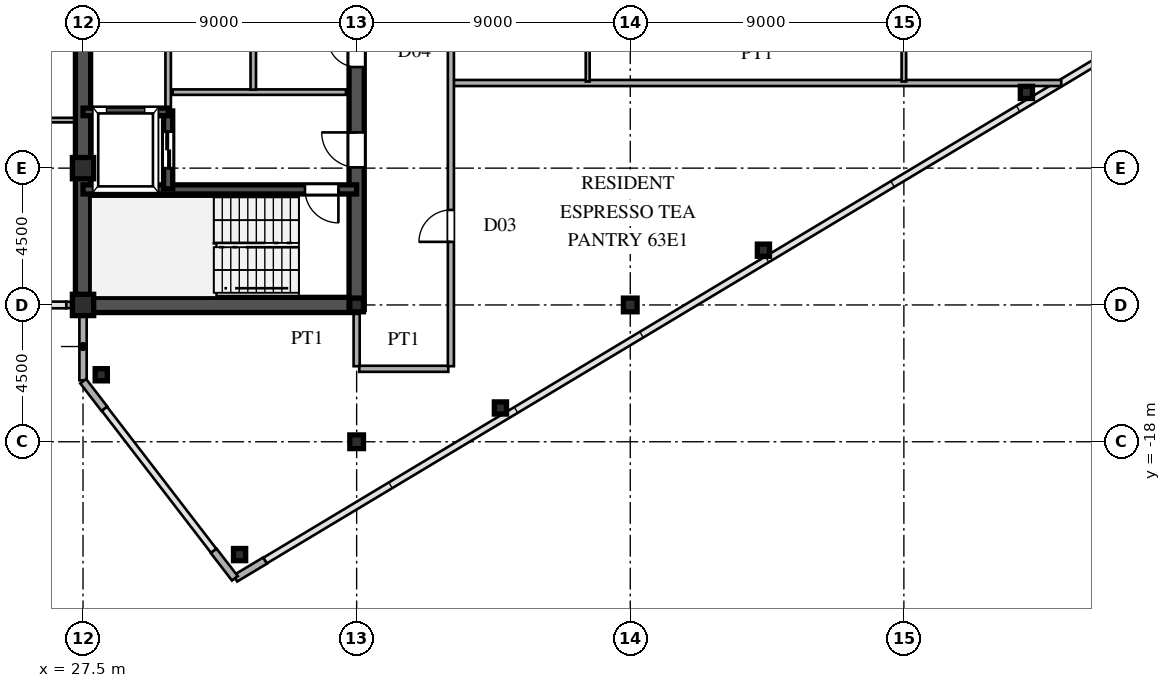
"""IFC4 building model, lengths in metres.
Left out: names, types, materials, properties, quantities, classifications, styles, units other than length and angle.
Written with IfcOpenShell. Run it as: python <this file> out.ifc"""

import sys

from ifc_helpers import new_model, si_unit, direction, frame, frame_2d, origin, origin_2d, place, context, subcontext, project, spatial, rectangle, hollow_rectangle, i_section, extrude, source, transform, mapped, element, fill, save


model = new_model("IFC4")
c1 = context("Model", 3, precision=1e-05, world=origin(), true_north=direction((0.0, 1.0)))
c2 = subcontext(c1, "Body", "Model", "MODEL_VIEW")
j1 = project(units=[si_unit("LENGTHUNIT", "METRE"), si_unit("PLANEANGLEUNIT", "RADIAN")], contexts=[c1])
p1 = place(None, origin())
s1 = spatial("IfcSite", under=j1, at=p1, CompositionType="ELEMENT")
p2 = place(p1, origin())
s2 = spatial("IfcBuilding", under=s1, at=p2, CompositionType="ELEMENT")
p3 = place(p2, frame((0.0, 0.0, 239.4)))
s3 = spatial("IfcBuildingStorey", under=s2, at=p3, CompositionType="ELEMENT", Elevation=239.4)
m1 = source(origin(), c2, "Body", "SweptSolid", [
    extrude(hollow_rectangle(XDim=0.7, YDim=0.7, WallThickness=0.03, at=origin_2d()), origin(), (0.0, 0.0, 1.0), 3.75),
])
for number, where, z_axis, x_axis in (
    (1, (27.5, -13.5, 0.0), (0.0, 0.0, 1.0), (1.0, 0.0, 0.0)),
    (2, (27.5, -9.0, 0.0), (0.0, 0.0, 1.0), (1.0, 0.0, 0.0)),
):
    element("IfcColumn", number, at=place(p3, frame(where, z_axis=z_axis, x_axis=x_axis)), inside=s3, PredefinedType="COLUMN", context=c2, shape_type="MappedRepresentation", body=[
        mapped(m1, transform((0.0, 0.0, 0.0), scale=1.0)),
    ])
m2 = source(origin(), c2, "Body", "SweptSolid", [
    extrude(i_section(OverallWidth=0.45, OverallDepth=0.45, WebThickness=0.016, FlangeThickness=0.025, at=origin_2d()), origin(), (0.0, 0.0, 1.0), 3.75),
])
for number, where, z_axis, x_axis in (
    (3, (36.5, -18.0, 0.0), (0.0, 0.0, 1.0), (1.0, 0.0, 0.0)),
    (4, (36.5, -13.5, 0.0), (0.0, 0.0, 1.0), (1.0, 0.0, 0.0)),
    (5, (45.5, -13.5, 0.0), (0.0, 0.0, 1.0), (1.0, 0.0, 0.0)),
):
    element("IfcColumn", number, at=place(p3, frame(where, z_axis=z_axis, x_axis=x_axis)), inside=s3, PredefinedType="COLUMN", context=c2, shape_type="MappedRepresentation", body=[
        mapped(m2, transform((0.0, 0.0, 0.0), scale=1.0)),
    ])
m3 = source(origin(), c2, "Body", "SweptSolid", [
    extrude(hollow_rectangle(XDim=0.4, YDim=0.4, WallThickness=0.016, at=origin_2d()), origin(), (0.0, 0.0, 1.0), 3.75),
])
for number, where, z_axis, x_axis in (
    (6, (32.65, -21.71, 0.0), (0.0, 0.0, 1.0), (1.0, 0.0, 0.0)),
    (7, (28.1, -15.796, 0.0), (0.0, 0.0, 1.0), (1.0, 0.0, 0.0)),
    (8, (41.23, -16.889, 0.0), (0.0, 0.0, 1.0), (1.0, 0.0, 0.0)),
    (9, (49.88, -11.699, 0.0), (0.0, 0.0, 1.0), (1.0, 0.0, 0.0)),
    (10, (58.53, -6.509, 0.0), (0.0, 0.0, 1.0), (1.0, 0.0, 0.0)),
):
    element("IfcColumn", number, at=place(p3, frame(where, z_axis=z_axis, x_axis=x_axis)), inside=s3, PredefinedType="COLUMN", context=c2, shape_type="MappedRepresentation", body=[
        mapped(m3, transform((0.0, 0.0, 0.0), scale=1.0)),
    ])
p4 = place(p3, frame((32.509, -22.495, 0.0), z_axis=(0.0, 0.0, 1.0), x_axis=(0.85743623509, 0.514590228002, 0.0)))
e11 = element("IfcWall", 11, at=p4, inside=s3, PredefinedType="SOLIDWALL", context=c2, shape_type="SweptSolid", body=[
    extrude(rectangle(XDim=1.14, YDim=0.24, at=frame_2d((0.57, 0.0))), origin(), (0.0, 0.0, 1.0), 3.53),
])
p5 = place(p3, frame((27.5, -15.98, 0.0), z_axis=(0.0, 0.0, 1.0), x_axis=(0.0, 1.0, 0.0)))
e12 = element("IfcWall", 12, at=p5, inside=s3, PredefinedType="SOLIDWALL", context=c2, shape_type="SweptSolid", body=[
    extrude(rectangle(XDim=1.605, YDim=0.24, at=frame_2d((0.803, 0.0))), origin(), (0.0, 0.0, 1.0), 3.53),
])
p6 = place(p3, frame((27.5, -14.375, 0.0), z_axis=(0.0, 0.0, 1.0), x_axis=(0.0, 1.0, 0.0)))
e13 = element("IfcWall", 13, at=p6, inside=s3, PredefinedType="SOLIDWALL", context=c2, shape_type="SweptSolid", body=[
    extrude(rectangle(XDim=0.62, YDim=0.24, at=frame_2d((0.31, 0.0))), origin(), (0.0, 0.0, 1.0), 3.03),
])
for number, where, z_axis, x_axis in (
    (14, (27.506, -16.008, 0.0), (0.0, 0.0, 1.0), (0.61, -0.793, 0.0)),
    (15, (31.799, -21.588, 0.0), (0.0, 0.0, 1.0), (0.61, -0.793, 0.0)),
):
    element("IfcWall", number, at=place(p3, frame(where, z_axis=z_axis, x_axis=x_axis)), inside=s3, PredefinedType="SOLIDWALL", context=c2, shape_type="SweptSolid", body=[
        extrude(rectangle(XDim=1.14, YDim=0.24, at=frame_2d((0.57, 0.0))), origin(), (0.0, 0.0, 1.0), 3.53),
    ])
p7 = place(p3, frame((26.95, -13.5, 0.0), z_axis=(0.0, 0.0, 1.0), x_axis=(1.0, 0.0, 0.0)))
e16 = element("IfcWall", 16, at=p7, inside=s3, PredefinedType="SOLIDWALL", context=c2, shape_type="SweptSolid", body=[
    extrude(rectangle(XDim=0.54, YDim=0.21, at=frame_2d((0.27, 0.0))), origin(), (0.0, 0.0, 1.0), 3.03),
])
p8 = place(p3, frame((27.5, -13.5, 0.0), z_axis=(0.0, 0.0, 1.0), x_axis=(0.0, 1.0, 0.0)))
e17 = element("IfcWall", 17, at=p8, inside=s3, PredefinedType="SHEAR", context=c2, shape_type="SweptSolid", body=[
    extrude(rectangle(XDim=12.2, YDim=0.5, at=frame_2d((6.1, 0.0))), origin(), (0.0, 0.0, 1.0), 3.53),
])
p9 = place(p3, frame((27.5, -13.5, 0.0), z_axis=(0.0, 0.0, 1.0), x_axis=(1.0, 0.0, 0.0)))
e18 = element("IfcWall", 18, at=p9, inside=s3, PredefinedType="SHEAR", context=c2, shape_type="SweptSolid", body=[
    extrude(rectangle(XDim=9.0, YDim=0.5, at=frame_2d((4.5, 0.0))), origin(), (0.0, 0.0, 1.0), 3.53),
])
p10 = place(p3, frame((36.5, -13.65, 0.0), z_axis=(0.0, 0.0, 1.0), x_axis=(0.0, 1.0, 0.0)))
e19 = element("IfcWall", 19, at=p10, inside=s3, PredefinedType="SHEAR", context=c2, shape_type="SweptSolid", body=[
    extrude(rectangle(XDim=7.15, YDim=0.5, at=frame_2d((3.575, 0.0))), origin(), (0.0, 0.0, 1.0), 3.53),
])
p11 = place(p10, frame((4.675, 0.0, 0.0)))
e20 = element("IfcOpeningElement", 20, at=p11, cuts=e19, PredefinedType="OPENING", context=c2, shape_type="SweptSolid", body=[
    extrude(rectangle(XDim=1.15, YDim=2.2, at=frame_2d((0.575, 1.1))), frame((0.0, 0.26, 0.0), z_axis=(0.0, -1.0, 0.0), x_axis=(1.0, 0.0, 0.0)), (0.0, 0.0, 1.0), 0.52),
])
p12 = place(p3, frame((36.5, -6.5, 0.0), z_axis=(0.0, 0.0, 1.0), x_axis=(0.0, 1.0, 0.0)))
e21 = element("IfcWall", 21, at=p12, inside=s3, PredefinedType="SHEAR", context=c2, shape_type="SweptSolid", body=[
    extrude(rectangle(XDim=2.6, YDim=0.5, at=frame_2d((1.3, 0.0))), origin(), (0.0, 0.0, 1.0), 3.53),
])
p13 = place(p12, frame((0.825, 0.0, 0.0)))
e22 = element("IfcOpeningElement", 22, at=p13, cuts=e21, PredefinedType="OPENING", context=c2, shape_type="SweptSolid", body=[
    extrude(rectangle(XDim=0.95, YDim=2.15, at=frame_2d((0.475, 1.075))), frame((0.0, 0.26, 0.0), z_axis=(0.0, -1.0, 0.0), x_axis=(1.0, 0.0, 0.0)), (0.0, 0.0, 1.0), 0.52),
])
p14 = place(p3, frame((27.5, -9.7, 0.0), z_axis=(0.0, 0.0, 1.0), x_axis=(1.0, 0.0, 0.0)))
e23 = element("IfcWall", 23, at=p14, inside=s3, PredefinedType="SHEAR", context=c2, shape_type="SweptSolid", body=[
    extrude(rectangle(XDim=9.0, YDim=0.3, at=frame_2d((4.5, 0.0))), origin(), (0.0, 0.0, 1.0), 3.53),
])
p15 = place(p14, frame((7.3, 0.0, 0.0)))
e24 = element("IfcOpeningElement", 24, at=p15, cuts=e23, PredefinedType="OPENING", context=c2, shape_type="SweptSolid", body=[
    extrude(rectangle(XDim=1.1, YDim=2.2, at=frame_2d((0.55, 1.1))), frame((0.0, 0.16, 0.0), z_axis=(0.0, -1.0, 0.0), x_axis=(1.0, 0.0, 0.0)), (0.0, 0.0, 1.0), 0.32),
])
p16 = place(p3, frame((27.5, -7.15, 0.0), z_axis=(0.0, 0.0, 1.0), x_axis=(1.0, 0.0, 0.0)))
e25 = element("IfcWall", 25, at=p16, inside=s3, PredefinedType="SHEAR", context=c2, shape_type="SweptSolid", body=[
    extrude(rectangle(XDim=2.8, YDim=0.25, at=frame_2d((1.4, 0.0))), origin(), (0.0, 0.0, 1.0), 3.53),
])
p17 = place(p3, frame((30.3, -9.68, 0.0), z_axis=(0.0, 0.0, 1.0), x_axis=(0.0, 1.0, 0.0)))
e26 = element("IfcWall", 26, at=p17, inside=s3, PredefinedType="SHEAR", context=c2, shape_type="SweptSolid", body=[
    extrude(rectangle(XDim=2.56, YDim=0.3, at=frame_2d((1.28, 0.0))), origin(), (0.0, 0.0, 1.0), 3.53),
])
p18 = place(p17, frame((0.68, 0.0, 0.0)))
e27 = element("IfcOpeningElement", 27, at=p18, cuts=e26, PredefinedType="OPENING", context=c2, shape_type="SweptSolid", body=[
    extrude(rectangle(XDim=1.2, YDim=2.25, at=frame_2d((0.6, 1.125))), frame((0.0, 0.16, 0.0), z_axis=(0.0, -1.0, 0.0), x_axis=(1.0, 0.0, 0.0)), (0.0, 0.0, 1.0), 0.32),
])
p19 = place(p3, frame((30.45, -6.5, 0.0), z_axis=(0.0, 0.0, 1.0), x_axis=(1.0, 0.0, 0.0)))
e28 = element("IfcWall", 28, at=p19, inside=s3, PredefinedType="PARTITIONING", context=c2, shape_type="SweptSolid", body=[
    extrude(rectangle(XDim=5.7, YDim=0.18, at=frame_2d((2.85, 0.0))), origin(), (0.0, 0.0, 1.0), 3.53),
])
p20 = place(p3, frame((33.1, -6.42, 0.0), z_axis=(0.0, 0.0, 1.0), x_axis=(0.0, 1.0, 0.0)))
e29 = element("IfcWall", 29, at=p20, inside=s3, PredefinedType="PARTITIONING", context=c2, shape_type="SweptSolid", body=[
    extrude(rectangle(XDim=5.04, YDim=0.18, at=frame_2d((2.52, 0.0))), origin(), (0.0, 0.0, 1.0), 3.53),
])
p21 = place(p3, frame((30.3, -7.12, 0.0), z_axis=(0.0, 0.0, 1.0), x_axis=(0.0, 1.0, 0.0)))
e30 = element("IfcWall", 30, at=p21, inside=s3, PredefinedType="PARTITIONING", context=c2, shape_type="SweptSolid", body=[
    extrude(rectangle(XDim=5.74, YDim=0.18, at=frame_2d((2.87, 0.0))), origin(), (0.0, 0.0, 1.0), 3.53),
])
p22 = place(p3, frame((36.585, -15.6, 0.0), z_axis=(0.0, 0.0, 1.0), x_axis=(1.0, 0.0, 0.0)))
e31 = element("IfcWall", 31, at=p22, inside=s3, PredefinedType="PARTITIONING", context=c2, shape_type="SweptSolid", body=[
    extrude(rectangle(XDim=2.93, YDim=0.2, at=frame_2d((1.465, 0.0))), origin(), (0.0, 0.0, 1.0), 3.53),
])
p23 = place(p3, frame((5.585, -7.42, 0.0), z_axis=(0.0, 0.0, 1.0), x_axis=(1.0, 0.0, 0.0)))
e32 = element("IfcWall", 32, at=p23, inside=s3, PredefinedType="PARTITIONING", context=c2, shape_type="SweptSolid", body=[
    extrude(rectangle(XDim=21.66, YDim=0.15, at=frame_2d((10.83, 0.0))), origin(), (0.0, 0.0, 1.0), 3.53),
])
p24 = place(p23, frame((3.94, 0.0, 0.0)))
e33 = element("IfcOpeningElement", 33, at=p24, cuts=e32, PredefinedType="OPENING", context=c2, shape_type="SweptSolid", body=[
    extrude(rectangle(XDim=0.95, YDim=2.15, at=frame_2d((0.475, 1.075))), frame((0.0, 0.085, 0.0), z_axis=(0.0, -1.0, 0.0), x_axis=(1.0, 0.0, 0.0)), (0.0, 0.0, 1.0), 0.17),
])
p25 = place(p23, frame((11.69, 0.0, 0.0)))
e34 = element("IfcOpeningElement", 34, at=p25, cuts=e32, PredefinedType="OPENING", context=c2, shape_type="SweptSolid", body=[
    extrude(rectangle(XDim=0.95, YDim=2.15, at=frame_2d((0.475, 1.075))), frame((0.0, 0.085, 0.0), z_axis=(0.0, -1.0, 0.0), x_axis=(1.0, 0.0, 0.0)), (0.0, 0.0, 1.0), 0.17),
])
p26 = place(p23, frame((18.19, 0.0, 0.0)))
e35 = element("IfcOpeningElement", 35, at=p26, cuts=e32, PredefinedType="OPENING", context=c2, shape_type="SweptSolid", body=[
    extrude(rectangle(XDim=0.95, YDim=2.15, at=frame_2d((0.475, 1.075))), frame((0.0, 0.085, 0.0), z_axis=(0.0, -1.0, 0.0), x_axis=(1.0, 0.0, 0.0)), (0.0, 0.0, 1.0), 0.17),
])
p27 = place(p3, frame((39.68, -6.2, 0.0), z_axis=(0.0, 0.0, 1.0), x_axis=(1.0, 0.0, 0.0)))
e36 = element("IfcWall", 36, at=p27, inside=s3, PredefinedType="PARTITIONING", context=c2, shape_type="SweptSolid", body=[
    extrude(rectangle(XDim=19.996, YDim=0.2, at=frame_2d((9.998, 0.0))), origin(), (0.0, 0.0, 1.0), 3.53),
])
p28 = place(p3, frame((36.5, -15.515, 0.0), z_axis=(0.0, 0.0, 1.0), x_axis=(0.0, 1.0, 0.0)))
e37 = element("IfcWall", 37, at=p28, inside=s3, PredefinedType="PARTITIONING", context=c2, shape_type="SweptSolid", body=[
    extrude(rectangle(XDim=1.76, YDim=0.2, at=frame_2d((0.88, 0.0))), origin(), (0.0, 0.0, 1.0), 2.93),
])
p29 = place(p3, frame((39.6, -15.515, 0.0), z_axis=(0.0, 0.0, 1.0), x_axis=(0.0, 1.0, 0.0)))
e38 = element("IfcWall", 38, at=p29, inside=s3, PredefinedType="PARTITIONING", context=c2, shape_type="SweptSolid", body=[
    extrude(rectangle(XDim=31.03, YDim=0.2, at=frame_2d((15.515, 0.0))), origin(), (0.0, 0.0, 1.0), 3.53),
])
p30 = place(p29, frame((4.09, 0.0, 0.0)))
e39 = element("IfcOpeningElement", 39, at=p30, cuts=e38, PredefinedType="OPENING", context=c2, shape_type="SweptSolid", body=[
    extrude(rectangle(XDim=1.05, YDim=2.25, at=frame_2d((0.525, 1.125))), frame((0.0, 0.11, 0.0), z_axis=(0.0, -1.0, 0.0), x_axis=(1.0, 0.0, 0.0)), (0.0, 0.0, 1.0), 0.22),
])
p31 = place(p29, frame((14.998, 0.0, 0.0)))
e40 = element("IfcOpeningElement", 40, at=p31, cuts=e38, PredefinedType="OPENING", context=c2, shape_type="SweptSolid", body=[
    extrude(rectangle(XDim=1.05, YDim=2.25, at=frame_2d((0.525, 1.125))), frame((0.0, 0.11, 0.0), z_axis=(0.0, -1.0, 0.0), x_axis=(1.0, 0.0, 0.0)), (0.0, 0.0, 1.0), 0.22),
])
p32 = place(p29, frame((26.09, 0.0, 0.0)))
e41 = element("IfcOpeningElement", 41, at=p32, cuts=e38, PredefinedType="OPENING", context=c2, shape_type="SweptSolid", body=[
    extrude(rectangle(XDim=1.05, YDim=2.25, at=frame_2d((0.525, 1.125))), frame((0.0, 0.11, 0.0), z_axis=(0.0, -1.0, 0.0), x_axis=(1.0, 0.0, 0.0)), (0.0, 0.0, 1.0), 0.22),
])
p33 = place(p3, frame((44.1, -6.15, 0.0), z_axis=(0.0, 0.0, 1.0), x_axis=(0.0, 1.0, 0.0)))
e42 = element("IfcWall", 42, at=p33, inside=s3, PredefinedType="PARTITIONING", context=c2, shape_type="SweptSolid", body=[
    extrude(rectangle(XDim=3.354, YDim=0.13, at=frame_2d((1.677, 0.0))), origin(), (0.0, 0.0, 1.0), 3.53),
])
p34 = place(p3, frame((54.5, -6.15, 0.0), z_axis=(0.0, 0.0, 1.0), x_axis=(0.0, 1.0, 0.0)))
e43 = element("IfcWall", 43, at=p34, inside=s3, PredefinedType="PARTITIONING", context=c2, shape_type="SweptSolid", body=[
    extrude(rectangle(XDim=12.7, YDim=0.15, at=frame_2d((6.35, 0.0))), origin(), (0.0, 0.0, 1.0), 2.93),
])
p35 = place(p34, frame((5.875, 0.0, 0.0)))
e44 = element("IfcOpeningElement", 44, at=p35, cuts=e43, PredefinedType="OPENING", context=c2, shape_type="SweptSolid", body=[
    extrude(rectangle(XDim=0.95, YDim=2.15, at=frame_2d((0.475, 1.075))), frame((0.0, 0.085, 0.0), z_axis=(0.0, -1.0, 0.0), x_axis=(1.0, 0.0, 0.0)), (0.0, 0.0, 1.0), 0.17),
])
m4 = source(origin(), c2, "Body", "SweptSolid", [
    extrude(rectangle(XDim=1.15, YDim=2.2, at=frame_2d((0.575, 1.1))), frame((0.0, 0.025, 0.0), z_axis=(0.0, -1.0, 0.0), x_axis=(1.0, 0.0, 0.0)), (0.0, 0.0, 1.0), 0.05),
])
p36 = place(p11, origin())
e45 = element("IfcDoor", 45, at=p36, inside=s3, OperationType="SINGLE_SWING_RIGHT", PredefinedType="DOOR", context=c2, shape_type="MappedRepresentation", body=[
    mapped(m4, transform((0.0, 0.0, 0.0), scale=1.0)),
])
fill(e20, e45)
m5 = source(origin(), c2, "Body", "SweptSolid", [
    extrude(rectangle(XDim=0.95, YDim=2.15, at=frame_2d((0.475, 1.075))), frame((0.0, 0.025, 0.0), z_axis=(0.0, -1.0, 0.0), x_axis=(1.0, 0.0, 0.0)), (0.0, 0.0, 1.0), 0.05),
])
p37 = place(p13, origin())
e46 = element("IfcDoor", 46, at=p37, inside=s3, OperationType="SINGLE_SWING_RIGHT", PredefinedType="DOOR", context=c2, shape_type="MappedRepresentation", body=[
    mapped(m5, transform((0.0, 0.0, 0.0), scale=1.0)),
])
fill(e22, e46)
m6 = source(origin(), c2, "Body", "SweptSolid", [
    extrude(rectangle(XDim=1.1, YDim=2.2, at=frame_2d((0.55, 1.1))), frame((0.0, 0.025, 0.0), z_axis=(0.0, -1.0, 0.0), x_axis=(1.0, 0.0, 0.0)), (0.0, 0.0, 1.0), 0.05),
])
p38 = place(p15, frame((1.1, 0.0, 0.0), z_axis=(0.0, 0.0, 1.0), x_axis=(-1.0, 0.0, 0.0)))
e47 = element("IfcDoor", 47, at=p38, inside=s3, OperationType="SINGLE_SWING_RIGHT", PredefinedType="DOOR", context=c2, shape_type="MappedRepresentation", body=[
    mapped(m6, transform((0.0, 0.0, 0.0), scale=1.0)),
])
fill(e24, e47)
m7 = source(origin(), c2, "Body", "SweptSolid", [
    extrude(rectangle(XDim=1.2, YDim=2.25, at=frame_2d((0.6, 1.125))), frame((0.0, 0.025, 0.0), z_axis=(0.0, -1.0, 0.0), x_axis=(1.0, 0.0, 0.0)), (0.0, 0.0, 1.0), 0.05),
])
p39 = place(p18, origin())
e48 = element("IfcDoor", 48, at=p39, inside=s3, OperationType="DOUBLE_DOOR_SLIDING", PredefinedType="DOOR", context=c2, shape_type="MappedRepresentation", body=[
    mapped(m7, transform((0.0, 0.0, 0.0), scale=1.0)),
])
fill(e27, e48)
m8 = source(origin(), c2, "Body", "SweptSolid", [
    extrude(rectangle(XDim=1.05, YDim=2.25, at=frame_2d((0.525, 1.125))), frame((0.0, 0.025, 0.0), z_axis=(0.0, -1.0, 0.0), x_axis=(1.0, 0.0, 0.0)), (0.0, 0.0, 1.0), 0.05),
])
p40 = place(p30, origin())
e49 = element("IfcDoor", 49, at=p40, inside=s3, OperationType="SINGLE_SWING_LEFT", PredefinedType="DOOR", context=c2, shape_type="MappedRepresentation", body=[
    mapped(m8, transform((0.0, 0.0, 0.0), scale=1.0)),
])
fill(e39, e49)
save(model, sys.argv[1])
